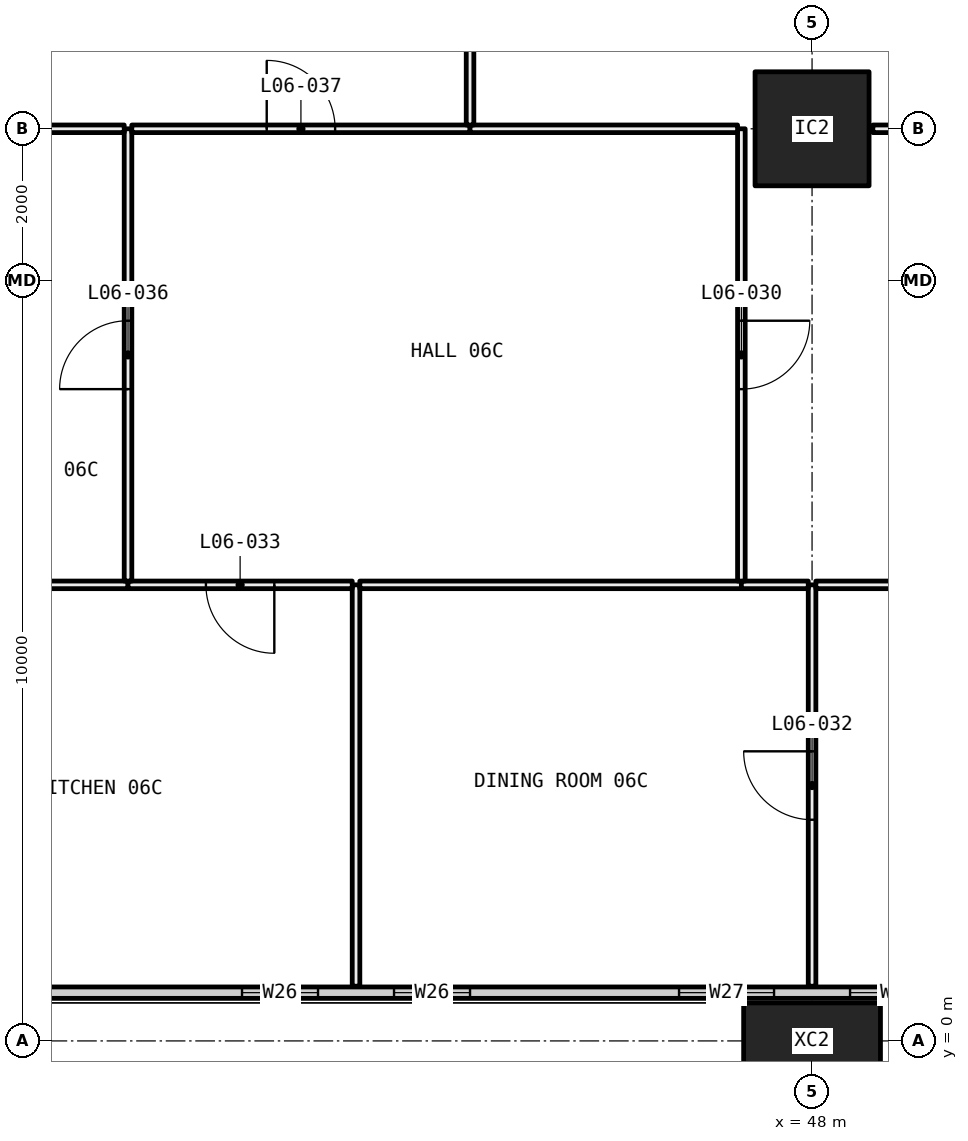
"""IFC4 building model, lengths in metres.
Left out: names, types, materials, properties, quantities, classifications, styles, units other than length and angle.
Written with IfcOpenShell. Run it as: python <this file> out.ifc"""

import sys

from ifc_helpers import new_model, si_unit, direction, frame, frame_2d, origin, origin_2d, place, context, subcontext, project, spatial, rectangle, hollow_rectangle, extrude, element, fill, save


model = new_model("IFC4")
c1 = context("Model", 3, precision=1e-05, world=origin(), true_north=direction((0.0, 1.0)))
c2 = subcontext(c1, "Body", "Model", "MODEL_VIEW")
j1 = project(units=[si_unit("LENGTHUNIT", "METRE"), si_unit("PLANEANGLEUNIT", "RADIAN")], contexts=[c1])
p1 = place(None, origin())
s1 = spatial("IfcSite", under=j1, at=p1, CompositionType="ELEMENT")
p2 = place(p1, origin())
s2 = spatial("IfcBuilding", under=s1, at=p2, CompositionType="ELEMENT")
p3 = place(p2, frame((0.0, 0.0, 33.45)))
s3 = spatial("IfcBuildingStorey", under=s2, at=p3, CompositionType="ELEMENT", Elevation=33.45)
p4 = place(p3, frame((48.0, 0.0, -0.4), z_axis=(0.0, 0.0, 1.0), x_axis=(1.0, 0.0, 0.0)))
e1 = element("IfcColumn", 1, at=p4, inside=s3, PredefinedType="COLUMN", context=c2, shape_type="SweptSolid", body=[
    extrude(hollow_rectangle(XDim=1.8, YDim=1.0, WallThickness=0.07, at=origin_2d()), origin(), (0.0, 0.0, 1.0), 3.45),
])
p5 = place(p3, frame((48.0, 12.0, 0.0), z_axis=(0.0, 0.0, 1.0), x_axis=(1.0, 0.0, 0.0)))
e2 = element("IfcColumn", 2, at=p5, inside=s3, PredefinedType="COLUMN", context=c2, shape_type="SweptSolid", body=[
    extrude(hollow_rectangle(XDim=1.5, YDim=1.5, WallThickness=0.065, at=origin_2d()), origin(), (0.0, 0.0, 1.0), 3.05),
])
p6 = place(p3, frame((6.56, 0.635, 0.0), z_axis=(0.0, 0.0, 1.0), x_axis=(1.0, 0.0, 0.0)))
e3 = element("IfcWall", 3, at=p6, inside=s3, PredefinedType="ELEMENTEDWALL", context=c2, shape_type="SweptSolid", body=[
    extrude(rectangle(XDim=58.88, YDim=0.15, at=frame_2d((29.44, 0.0))), origin(), (0.0, 0.0, 1.0), 3.05),
])
p7 = place(p6, frame((0.44, 0.0, 0.45)))
e4 = element("IfcOpeningElement", 4, at=p7, cuts=e3, PredefinedType="OPENING", context=c2, shape_type="SweptSolid", body=[
    extrude(rectangle(XDim=4.5, YDim=2.55, at=frame_2d((2.25, 1.275))), frame((0.0, 0.085, 0.0), z_axis=(0.0, -1.0, 0.0), x_axis=(1.0, 0.0, 0.0)), (0.0, 0.0, 1.0), 0.17),
])
p8 = place(p6, frame((5.94, 0.0, 0.45)))
e5 = element("IfcOpeningElement", 5, at=p8, cuts=e3, PredefinedType="OPENING", context=c2, shape_type="SweptSolid", body=[
    extrude(rectangle(XDim=1.25, YDim=2.55, at=frame_2d((0.625, 1.275))), frame((0.0, 0.085, 0.0), z_axis=(0.0, -1.0, 0.0), x_axis=(1.0, 0.0, 0.0)), (0.0, 0.0, 1.0), 0.17),
])
p9 = place(p6, frame((9.94, 0.0, 0.45)))
e6 = element("IfcOpeningElement", 6, at=p9, cuts=e3, PredefinedType="OPENING", context=c2, shape_type="SweptSolid", body=[
    extrude(rectangle(XDim=1.0, YDim=2.55, at=frame_2d((0.5, 1.275))), frame((0.0, 0.085, 0.0), z_axis=(0.0, -1.0, 0.0), x_axis=(1.0, 0.0, 0.0)), (0.0, 0.0, 1.0), 0.17),
])
p10 = place(p6, frame((11.94, 0.0, 0.45)))
e7 = element("IfcOpeningElement", 7, at=p10, cuts=e3, PredefinedType="OPENING", context=c2, shape_type="SweptSolid", body=[
    extrude(rectangle(XDim=1.0, YDim=2.55, at=frame_2d((0.5, 1.275))), frame((0.0, 0.085, 0.0), z_axis=(0.0, -1.0, 0.0), x_axis=(1.0, 0.0, 0.0)), (0.0, 0.0, 1.0), 0.17),
])
p11 = place(p6, frame((15.69, 0.0, 0.45)))
e8 = element("IfcOpeningElement", 8, at=p11, cuts=e3, PredefinedType="OPENING", context=c2, shape_type="SweptSolid", body=[
    extrude(rectangle(XDim=1.25, YDim=2.55, at=frame_2d((0.625, 1.275))), frame((0.0, 0.085, 0.0), z_axis=(0.0, -1.0, 0.0), x_axis=(1.0, 0.0, 0.0)), (0.0, 0.0, 1.0), 0.17),
])
p12 = place(p6, frame((17.94, 0.0, 0.45)))
e9 = element("IfcOpeningElement", 9, at=p12, cuts=e3, PredefinedType="OPENING", context=c2, shape_type="SweptSolid", body=[
    extrude(rectangle(XDim=1.25, YDim=2.55, at=frame_2d((0.625, 1.275))), frame((0.0, 0.085, 0.0), z_axis=(0.0, -1.0, 0.0), x_axis=(1.0, 0.0, 0.0)), (0.0, 0.0, 1.0), 0.17),
])
p13 = place(p6, frame((21.94, 0.0, 0.45)))
e10 = element("IfcOpeningElement", 10, at=p13, cuts=e3, PredefinedType="OPENING", context=c2, shape_type="SweptSolid", body=[
    extrude(rectangle(XDim=1.0, YDim=2.55, at=frame_2d((0.5, 1.275))), frame((0.0, 0.085, 0.0), z_axis=(0.0, -1.0, 0.0), x_axis=(1.0, 0.0, 0.0)), (0.0, 0.0, 1.0), 0.17),
])
p14 = place(p6, frame((23.94, 0.0, 0.45)))
e11 = element("IfcOpeningElement", 11, at=p14, cuts=e3, PredefinedType="OPENING", context=c2, shape_type="SweptSolid", body=[
    extrude(rectangle(XDim=1.0, YDim=2.55, at=frame_2d((0.5, 1.275))), frame((0.0, 0.085, 0.0), z_axis=(0.0, -1.0, 0.0), x_axis=(1.0, 0.0, 0.0)), (0.0, 0.0, 1.0), 0.17),
])
p15 = place(p6, frame((27.69, 0.0, 0.45)))
e12 = element("IfcOpeningElement", 12, at=p15, cuts=e3, PredefinedType="OPENING", context=c2, shape_type="SweptSolid", body=[
    extrude(rectangle(XDim=1.25, YDim=2.55, at=frame_2d((0.625, 1.275))), frame((0.0, 0.085, 0.0), z_axis=(0.0, -1.0, 0.0), x_axis=(1.0, 0.0, 0.0)), (0.0, 0.0, 1.0), 0.17),
])
p16 = place(p6, frame((29.94, 0.0, 0.45)))
e13 = element("IfcOpeningElement", 13, at=p16, cuts=e3, PredefinedType="OPENING", context=c2, shape_type="SweptSolid", body=[
    extrude(rectangle(XDim=1.25, YDim=2.55, at=frame_2d((0.625, 1.275))), frame((0.0, 0.085, 0.0), z_axis=(0.0, -1.0, 0.0), x_axis=(1.0, 0.0, 0.0)), (0.0, 0.0, 1.0), 0.17),
])
p17 = place(p6, frame((33.94, 0.0, 0.45)))
e14 = element("IfcOpeningElement", 14, at=p17, cuts=e3, PredefinedType="OPENING", context=c2, shape_type="SweptSolid", body=[
    extrude(rectangle(XDim=1.0, YDim=2.55, at=frame_2d((0.5, 1.275))), frame((0.0, 0.085, 0.0), z_axis=(0.0, -1.0, 0.0), x_axis=(1.0, 0.0, 0.0)), (0.0, 0.0, 1.0), 0.17),
])
p18 = place(p6, frame((35.94, 0.0, 0.45)))
e15 = element("IfcOpeningElement", 15, at=p18, cuts=e3, PredefinedType="OPENING", context=c2, shape_type="SweptSolid", body=[
    extrude(rectangle(XDim=1.0, YDim=2.55, at=frame_2d((0.5, 1.275))), frame((0.0, 0.085, 0.0), z_axis=(0.0, -1.0, 0.0), x_axis=(1.0, 0.0, 0.0)), (0.0, 0.0, 1.0), 0.17),
])
p19 = place(p6, frame((39.69, 0.0, 0.45)))
e16 = element("IfcOpeningElement", 16, at=p19, cuts=e3, PredefinedType="OPENING", context=c2, shape_type="SweptSolid", body=[
    extrude(rectangle(XDim=1.25, YDim=2.55, at=frame_2d((0.625, 1.275))), frame((0.0, 0.085, 0.0), z_axis=(0.0, -1.0, 0.0), x_axis=(1.0, 0.0, 0.0)), (0.0, 0.0, 1.0), 0.17),
])
p20 = place(p6, frame((41.94, 0.0, 0.45)))
e17 = element("IfcOpeningElement", 17, at=p20, cuts=e3, PredefinedType="OPENING", context=c2, shape_type="SweptSolid", body=[
    extrude(rectangle(XDim=1.25, YDim=2.55, at=frame_2d((0.625, 1.275))), frame((0.0, 0.085, 0.0), z_axis=(0.0, -1.0, 0.0), x_axis=(1.0, 0.0, 0.0)), (0.0, 0.0, 1.0), 0.17),
])
p21 = place(p6, frame((45.94, 0.0, 0.45)))
e18 = element("IfcOpeningElement", 18, at=p21, cuts=e3, PredefinedType="OPENING", context=c2, shape_type="SweptSolid", body=[
    extrude(rectangle(XDim=1.0, YDim=2.55, at=frame_2d((0.5, 1.275))), frame((0.0, 0.085, 0.0), z_axis=(0.0, -1.0, 0.0), x_axis=(1.0, 0.0, 0.0)), (0.0, 0.0, 1.0), 0.17),
])
p22 = place(p6, frame((47.94, 0.0, 0.45)))
e19 = element("IfcOpeningElement", 19, at=p22, cuts=e3, PredefinedType="OPENING", context=c2, shape_type="SweptSolid", body=[
    extrude(rectangle(XDim=1.0, YDim=2.55, at=frame_2d((0.5, 1.275))), frame((0.0, 0.085, 0.0), z_axis=(0.0, -1.0, 0.0), x_axis=(1.0, 0.0, 0.0)), (0.0, 0.0, 1.0), 0.17),
])
p23 = place(p6, frame((51.69, 0.0, 0.45)))
e20 = element("IfcOpeningElement", 20, at=p23, cuts=e3, PredefinedType="OPENING", context=c2, shape_type="SweptSolid", body=[
    extrude(rectangle(XDim=1.25, YDim=2.55, at=frame_2d((0.625, 1.275))), frame((0.0, 0.085, 0.0), z_axis=(0.0, -1.0, 0.0), x_axis=(1.0, 0.0, 0.0)), (0.0, 0.0, 1.0), 0.17),
])
p24 = place(p6, frame((53.94, 0.0, 0.45)))
e21 = element("IfcOpeningElement", 21, at=p24, cuts=e3, PredefinedType="OPENING", context=c2, shape_type="SweptSolid", body=[
    extrude(rectangle(XDim=4.5, YDim=2.55, at=frame_2d((2.25, 1.275))), frame((0.0, 0.085, 0.0), z_axis=(0.0, -1.0, 0.0), x_axis=(1.0, 0.0, 0.0)), (0.0, 0.0, 1.0), 0.17),
])
p25 = place(p3, frame((42.0, 0.72, 0.0), z_axis=(0.0, 0.0, 1.0), x_axis=(0.0, 1.0, 0.0)))
e22 = element("IfcWall", 22, at=p25, inside=s3, PredefinedType="PARTITIONING", context=c2, shape_type="SweptSolid", body=[
    extrude(rectangle(XDim=5.28, YDim=0.1, at=frame_2d((2.64, 0.0))), origin(), (0.0, 0.0, 1.0), 3.05),
])
p26 = place(p3, frame((39.0, 6.0, 0.0), z_axis=(0.0, 0.0, 1.0), x_axis=(-1.0, 0.0, 0.0)))
e23 = element("IfcWall", 23, at=p26, inside=s3, PredefinedType="PARTITIONING", context=c2, shape_type="SweptSolid", body=[
    extrude(rectangle(XDim=2.9, YDim=0.1, at=frame_2d((1.45, 0.0))), origin(), (0.0, 0.0, 1.0), 3.05),
])
p27 = place(p3, frame((41.95, 6.0, 0.0), z_axis=(0.0, 0.0, 1.0), x_axis=(-1.0, 0.0, 0.0)))
e24 = element("IfcWall", 24, at=p27, inside=s3, PredefinedType="PARTITIONING", context=c2, shape_type="SweptSolid", body=[
    extrude(rectangle(XDim=2.95, YDim=0.1, at=frame_2d((1.475, 0.0))), origin(), (0.0, 0.0, 1.0), 3.05),
])
p28 = place(p27, frame((1.025, 0.0, 0.0)))
e25 = element("IfcOpeningElement", 25, at=p28, cuts=e24, PredefinedType="OPENING", context=c2, shape_type="SweptSolid", body=[
    extrude(rectangle(XDim=0.9, YDim=2.1, at=frame_2d((0.45, 1.05))), frame((0.0, 0.06, 0.0), z_axis=(0.0, -1.0, 0.0), x_axis=(1.0, 0.0, 0.0)), (0.0, 0.0, 1.0), 0.12),
])
p29 = place(p3, frame((48.0, 0.72, 0.0), z_axis=(0.0, 0.0, 1.0), x_axis=(0.0, 1.0, 0.0)))
e26 = element("IfcWall", 26, at=p29, inside=s3, PredefinedType="PARTITIONING", context=c2, shape_type="SweptSolid", body=[
    extrude(rectangle(XDim=5.28, YDim=0.1, at=frame_2d((2.64, 0.0))), origin(), (0.0, 0.0, 1.0), 2.45),
])
p30 = place(p29, frame((2.19, 0.0, 0.0)))
e27 = element("IfcOpeningElement", 27, at=p30, cuts=e26, PredefinedType="OPENING", context=c2, shape_type="SweptSolid", body=[
    extrude(rectangle(XDim=0.9, YDim=2.1, at=frame_2d((0.45, 1.05))), frame((0.0, 0.06, 0.0), z_axis=(0.0, -1.0, 0.0), x_axis=(1.0, 0.0, 0.0)), (0.0, 0.0, 1.0), 0.12),
])
p31 = place(p3, frame((47.07, 6.0, 0.0), z_axis=(0.0, 0.0, 1.0), x_axis=(-1.0, 0.0, 0.0)))
e28 = element("IfcWall", 28, at=p31, inside=s3, PredefinedType="PARTITIONING", context=c2, shape_type="SweptSolid", body=[
    extrude(rectangle(XDim=5.02, YDim=0.1, at=frame_2d((2.51, 0.0))), origin(), (0.0, 0.0, 1.0), 3.05),
])
p32 = place(p3, frame((47.95, 6.0, 0.0), z_axis=(0.0, 0.0, 1.0), x_axis=(-1.0, 0.0, 0.0)))
e29 = element("IfcWall", 29, at=p32, inside=s3, PredefinedType="PARTITIONING", context=c2, shape_type="SweptSolid", body=[
    extrude(rectangle(XDim=0.88, YDim=0.1, at=frame_2d((0.44, 0.0))), origin(), (0.0, 0.0, 1.0), 2.45),
])
p33 = place(p3, frame((55.14, 6.0, 0.0), z_axis=(0.0, 0.0, 1.0), x_axis=(-1.0, 0.0, 0.0)))
e30 = element("IfcWall", 30, at=p33, inside=s3, PredefinedType="PARTITIONING", context=c2, shape_type="SweptSolid", body=[
    extrude(rectangle(XDim=7.09, YDim=0.1, at=frame_2d((3.545, 0.0))), origin(), (0.0, 0.0, 1.0), 2.45),
])
p34 = place(p33, frame((3.095, 0.0, 0.0)))
e31 = element("IfcOpeningElement", 31, at=p34, cuts=e30, PredefinedType="OPENING", context=c2, shape_type="SweptSolid", body=[
    extrude(rectangle(XDim=0.9, YDim=2.1, at=frame_2d((0.45, 1.05))), frame((0.0, 0.06, 0.0), z_axis=(0.0, -1.0, 0.0), x_axis=(1.0, 0.0, 0.0)), (0.0, 0.0, 1.0), 0.12),
])
p35 = place(p3, frame((39.0, 6.05, 0.0), z_axis=(0.0, 0.0, 1.0), x_axis=(0.0, 1.0, 0.0)))
e32 = element("IfcWall", 32, at=p35, inside=s3, PredefinedType="PARTITIONING", context=c2, shape_type="SweptSolid", body=[
    extrude(rectangle(XDim=5.95, YDim=0.1, at=frame_2d((2.975, 0.0))), origin(), (0.0, 0.0, 1.0), 2.45),
])
p36 = place(p35, frame((2.525, 0.0, 0.0)))
e33 = element("IfcOpeningElement", 33, at=p36, cuts=e32, PredefinedType="OPENING", context=c2, shape_type="SweptSolid", body=[
    extrude(rectangle(XDim=0.9, YDim=2.1, at=frame_2d((0.45, 1.05))), frame((0.0, 0.06, 0.0), z_axis=(0.0, -1.0, 0.0), x_axis=(1.0, 0.0, 0.0)), (0.0, 0.0, 1.0), 0.12),
])
p37 = place(p3, frame((38.95, 12.0, 0.0), z_axis=(0.0, 0.0, 1.0), x_axis=(-1.0, 0.0, 0.0)))
e34 = element("IfcWall", 34, at=p37, inside=s3, PredefinedType="PARTITIONING", context=c2, shape_type="SweptSolid", body=[
    extrude(rectangle(XDim=2.15, YDim=0.1, at=frame_2d((1.075, 0.0))), origin(), (0.0, 0.0, 1.0), 2.45),
])
p38 = place(p3, frame((47.07, 6.05, 0.0), z_axis=(0.0, 0.0, 1.0), x_axis=(0.0, 1.0, 0.0)))
e35 = element("IfcWall", 35, at=p38, inside=s3, PredefinedType="PARTITIONING", context=c2, shape_type="SweptSolid", body=[
    extrude(rectangle(XDim=5.95, YDim=0.1, at=frame_2d((2.975, 0.0))), origin(), (0.0, 0.0, 1.0), 2.45),
])
p39 = place(p38, frame((2.525, 0.0, 0.0)))
e36 = element("IfcOpeningElement", 36, at=p39, cuts=e35, PredefinedType="OPENING", context=c2, shape_type="SweptSolid", body=[
    extrude(rectangle(XDim=0.9, YDim=2.1, at=frame_2d((0.45, 1.05))), frame((0.0, 0.06, 0.0), z_axis=(0.0, -1.0, 0.0), x_axis=(1.0, 0.0, 0.0)), (0.0, 0.0, 1.0), 0.12),
])
p40 = place(p3, frame((43.5, 12.0, 0.0), z_axis=(0.0, 0.0, 1.0), x_axis=(-1.0, 0.0, 0.0)))
e37 = element("IfcWall", 37, at=p40, inside=s3, PredefinedType="PARTITIONING", context=c2, shape_type="SweptSolid", body=[
    extrude(rectangle(XDim=4.45, YDim=0.1, at=frame_2d((2.225, 0.0))), origin(), (0.0, 0.0, 1.0), 2.45),
])
p41 = place(p40, frame((1.775, 0.0, 0.0)))
e38 = element("IfcOpeningElement", 38, at=p41, cuts=e37, PredefinedType="OPENING", context=c2, shape_type="SweptSolid", body=[
    extrude(rectangle(XDim=0.9, YDim=2.1, at=frame_2d((0.45, 1.05))), frame((0.0, 0.06, 0.0), z_axis=(0.0, -1.0, 0.0), x_axis=(1.0, 0.0, 0.0)), (0.0, 0.0, 1.0), 0.12),
])
p42 = place(p3, frame((47.02, 12.0, 0.0), z_axis=(0.0, 0.0, 1.0), x_axis=(-1.0, 0.0, 0.0)))
e39 = element("IfcWall", 39, at=p42, inside=s3, PredefinedType="PARTITIONING", context=c2, shape_type="SweptSolid", body=[
    extrude(rectangle(XDim=3.52, YDim=0.1, at=frame_2d((1.76, 0.0))), origin(), (0.0, 0.0, 1.0), 2.45),
])
p43 = place(p3, frame((51.0, 12.0, 0.0), z_axis=(0.0, 0.0, 1.0), x_axis=(-1.0, 0.0, 0.0)))
e40 = element("IfcWall", 40, at=p43, inside=s3, PredefinedType="PARTITIONING", context=c2, shape_type="SweptSolid", body=[
    extrude(rectangle(XDim=2.2, YDim=0.1, at=frame_2d((1.1, 0.0))), origin(), (0.0, 0.0, 1.0), 2.45),
])
p44 = place(p3, frame((43.5, 12.05, 0.0), z_axis=(0.0, 0.0, 1.0), x_axis=(0.0, 1.0, 0.0)))
e41 = element("IfcWall", 41, at=p44, inside=s3, PredefinedType="PARTITIONING", context=c2, shape_type="SweptSolid", body=[
    extrude(rectangle(XDim=5.95, YDim=0.1, at=frame_2d((2.975, 0.0))), origin(), (0.0, 0.0, 1.0), 2.45),
])
p45 = place(p17, origin())
e42 = element("IfcWindow", 42, at=p45, inside=s3, PartitioningType="SINGLE_PANEL", PredefinedType="WINDOW", context=c2, shape_type="SweptSolid", body=[
    extrude(rectangle(XDim=1.0, YDim=2.55, at=frame_2d((0.5, 1.275))), frame((0.0, 0.03, 0.0), z_axis=(0.0, -1.0, 0.0), x_axis=(1.0, 0.0, 0.0)), (0.0, 0.0, 1.0), 0.06),
])
fill(e14, e42)
p46 = place(p18, origin())
e43 = element("IfcWindow", 43, at=p46, inside=s3, PartitioningType="SINGLE_PANEL", PredefinedType="WINDOW", context=c2, shape_type="SweptSolid", body=[
    extrude(rectangle(XDim=1.0, YDim=2.55, at=frame_2d((0.5, 1.275))), frame((0.0, 0.03, 0.0), z_axis=(0.0, -1.0, 0.0), x_axis=(1.0, 0.0, 0.0)), (0.0, 0.0, 1.0), 0.06),
])
fill(e15, e43)
p47 = place(p19, origin())
e44 = element("IfcWindow", 44, at=p47, inside=s3, PartitioningType="SINGLE_PANEL", PredefinedType="WINDOW", context=c2, shape_type="SweptSolid", body=[
    extrude(rectangle(XDim=1.25, YDim=2.55, at=frame_2d((0.625, 1.275))), frame((0.0, 0.03, 0.0), z_axis=(0.0, -1.0, 0.0), x_axis=(1.0, 0.0, 0.0)), (0.0, 0.0, 1.0), 0.06),
])
fill(e16, e44)
p48 = place(p20, origin())
e45 = element("IfcWindow", 45, at=p48, inside=s3, PartitioningType="SINGLE_PANEL", PredefinedType="WINDOW", context=c2, shape_type="SweptSolid", body=[
    extrude(rectangle(XDim=1.25, YDim=2.55, at=frame_2d((0.625, 1.275))), frame((0.0, 0.03, 0.0), z_axis=(0.0, -1.0, 0.0), x_axis=(1.0, 0.0, 0.0)), (0.0, 0.0, 1.0), 0.06),
])
fill(e17, e45)
p49 = place(p39, frame((0.9, 0.0, 0.0), x_axis=(-1.0, 0.0, 0.0)))
e46 = element("IfcDoor", 46, at=p49, inside=s3, OperationType="SINGLE_SWING_RIGHT", PredefinedType="DOOR", context=c2, shape_type="SweptSolid", body=[
    extrude(rectangle(XDim=0.9, YDim=2.1, at=frame_2d((0.45, 1.05))), frame((0.0, 0.025, 0.0), z_axis=(0.0, -1.0, 0.0), x_axis=(1.0, 0.0, 0.0)), (0.0, 0.0, 1.0), 0.05),
])
fill(e36, e46)
p50 = place(p30, origin())
e47 = element("IfcDoor", 47, at=p50, inside=s3, OperationType="SINGLE_SWING_LEFT", PredefinedType="DOOR", context=c2, shape_type="SweptSolid", body=[
    extrude(rectangle(XDim=0.9, YDim=2.1, at=frame_2d((0.45, 1.05))), frame((0.0, 0.025, 0.0), z_axis=(0.0, -1.0, 0.0), x_axis=(1.0, 0.0, 0.0)), (0.0, 0.0, 1.0), 0.05),
])
fill(e27, e47)
p51 = place(p28, origin())
e48 = element("IfcDoor", 48, at=p51, inside=s3, OperationType="SINGLE_SWING_RIGHT", PredefinedType="DOOR", context=c2, shape_type="SweptSolid", body=[
    extrude(rectangle(XDim=0.9, YDim=2.1, at=frame_2d((0.45, 1.05))), frame((0.0, 0.025, 0.0), z_axis=(0.0, -1.0, 0.0), x_axis=(1.0, 0.0, 0.0)), (0.0, 0.0, 1.0), 0.05),
])
fill(e25, e48)
p52 = place(p36, origin())
e49 = element("IfcDoor", 49, at=p52, inside=s3, OperationType="SINGLE_SWING_RIGHT", PredefinedType="DOOR", context=c2, shape_type="SweptSolid", body=[
    extrude(rectangle(XDim=0.9, YDim=2.1, at=frame_2d((0.45, 1.05))), frame((0.0, 0.025, 0.0), z_axis=(0.0, -1.0, 0.0), x_axis=(1.0, 0.0, 0.0)), (0.0, 0.0, 1.0), 0.05),
])
fill(e33, e49)
p53 = place(p41, frame((0.9, 0.0, 0.0), x_axis=(-1.0, 0.0, 0.0)))
e50 = element("IfcDoor", 50, at=p53, inside=s3, OperationType="SINGLE_SWING_RIGHT", PredefinedType="DOOR", context=c2, shape_type="SweptSolid", body=[
    extrude(rectangle(XDim=0.9, YDim=2.1, at=frame_2d((0.45, 1.05))), frame((0.0, 0.025, 0.0), z_axis=(0.0, -1.0, 0.0), x_axis=(1.0, 0.0, 0.0)), (0.0, 0.0, 1.0), 0.05),
])
fill(e38, e50)
save(model, sys.argv[1])
